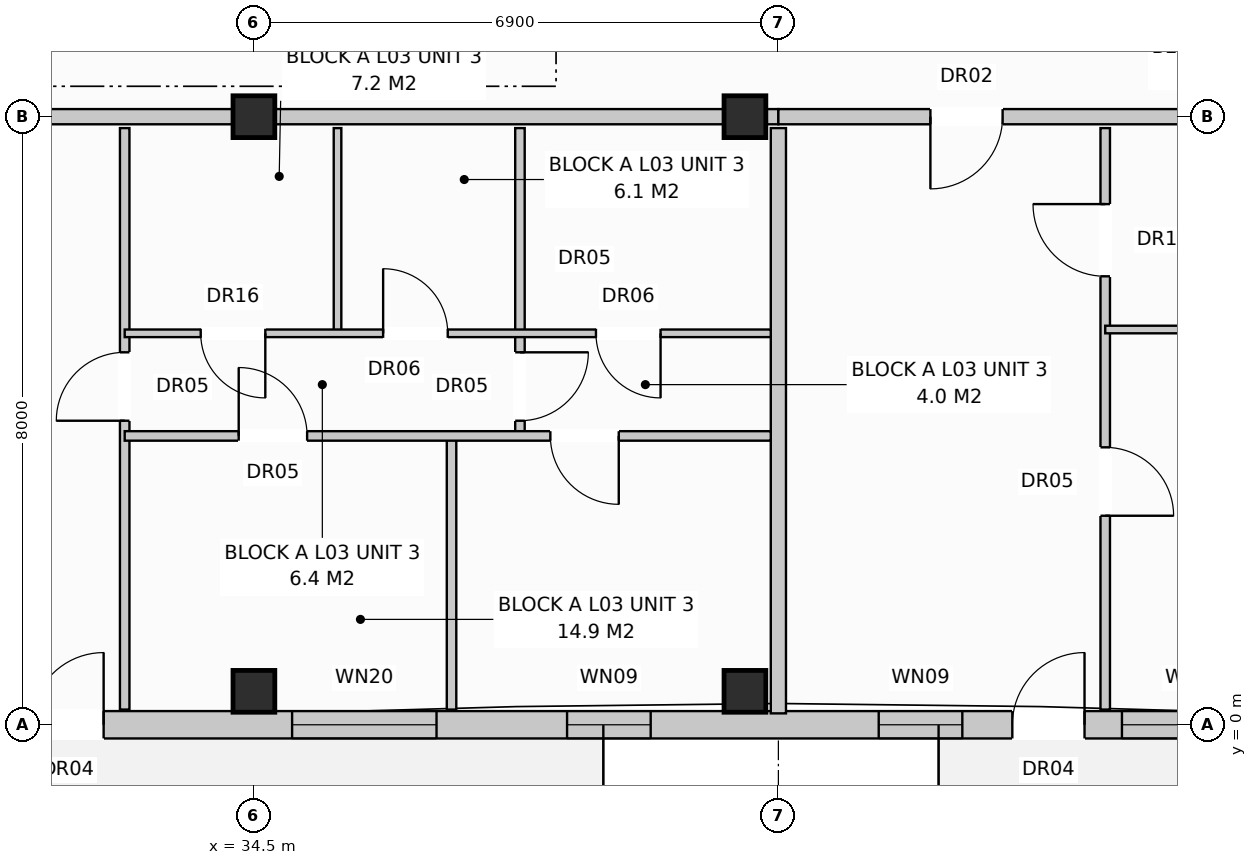
"""IFC4 building model, lengths in metres.
Left out: names, types, materials, properties, quantities, classifications, styles, units other than length and angle.
Written with IfcOpenShell. Run it as: python <this file> out.ifc"""

import sys

from ifc_helpers import new_model, si_unit, direction, frame, frame_2d, origin, origin_with_axes, origin_2d, place, context, subcontext, project, spatial, rectangle, extrude, element, fill, save


model = new_model("IFC4")
c1 = context("Model", 3, precision=1e-05, world=origin(), true_north=direction((0.0, 1.0)))
c2 = subcontext(c1, "Body", "Model", "MODEL_VIEW")
j1 = project(units=[si_unit("LENGTHUNIT", "METRE"), si_unit("PLANEANGLEUNIT", "RADIAN")], contexts=[c1])
p1 = place(None, origin())
s1 = spatial("IfcSite", under=j1, at=p1, CompositionType="ELEMENT")
p2 = place(p1, origin())
s2 = spatial("IfcBuilding", under=s1, at=p2, CompositionType="ELEMENT")
p3 = place(p2, frame((0.0, 0.0, 11.2)))
s3 = spatial("IfcBuildingStorey", under=s2, at=p3, CompositionType="ELEMENT", Elevation=11.2)
for number, where, z_axis, x_axis in (
    (1, (34.5, 0.44, 0.0), (0.0, 0.0, 1.0), (1.0, 0.0, 0.0)),
    (2, (34.5, 8.0, 0.0), (0.0, 0.0, 1.0), (1.0, 0.0, 0.0)),
    (3, (40.96, 0.44, 0.0), (0.0, 0.0, 1.0), (1.0, 0.0, 0.0)),
    (4, (40.96, 8.0, 0.0), (0.0, 0.0, 1.0), (1.0, 0.0, 0.0)),
):
    element("IfcColumn", number, at=place(p3, frame(where, z_axis=z_axis, x_axis=x_axis)), inside=s3, PredefinedType="COLUMN", context=c2, shape_type="SweptSolid", body=[
        extrude(rectangle(XDim=0.55, YDim=0.55, at=origin_2d()), origin(), (0.0, 0.0, 1.0), 3.2),
    ])
p4 = place(p3, frame((0.17, 0.0, 0.0), z_axis=(0.0, 0.0, 1.0), x_axis=(1.0, 0.0, 0.0)))
e5 = element("IfcWall", 5, at=p4, inside=s3, PredefinedType="STANDARD", context=c2, shape_type="SweptSolid", body=[
    extrude(rectangle(XDim=54.86, YDim=0.36, at=frame_2d((27.43, 0.0))), origin(), (0.0, 0.0, 1.0), 2.94),
])
p5 = place(p4, frame((4.903, 0.0, 0.0)))
e6 = element("IfcOpeningElement", 6, at=p5, cuts=e5, PredefinedType="OPENING", context=c2, shape_type="SweptSolid", body=[
    extrude(rectangle(XDim=0.95, YDim=2.1, at=frame_2d((0.475, 1.05))), frame((0.0, 0.192, 0.0), z_axis=(0.0, -1.0, 0.0), x_axis=(1.0, 0.0, 0.0)), (0.0, 0.0, 1.0), 0.384),
])
p6 = place(p4, frame((18.9, 0.0, 0.0)))
e7 = element("IfcOpeningElement", 7, at=p6, cuts=e5, PredefinedType="OPENING", context=c2, shape_type="SweptSolid", body=[
    extrude(rectangle(XDim=0.95, YDim=2.1, at=frame_2d((0.475, 1.05))), frame((0.0, 0.192, 0.0), z_axis=(0.0, -1.0, 0.0), x_axis=(1.0, 0.0, 0.0)), (0.0, 0.0, 1.0), 0.384),
])
p7 = place(p4, frame((31.403, 0.0, 0.0)))
e8 = element("IfcOpeningElement", 8, at=p7, cuts=e5, PredefinedType="OPENING", context=c2, shape_type="SweptSolid", body=[
    extrude(rectangle(XDim=0.95, YDim=2.1, at=frame_2d((0.475, 1.05))), frame((0.0, 0.192, 0.0), z_axis=(0.0, -1.0, 0.0), x_axis=(1.0, 0.0, 0.0)), (0.0, 0.0, 1.0), 0.384),
])
p8 = place(p4, frame((44.308, 0.0, 0.0)))
e9 = element("IfcOpeningElement", 9, at=p8, cuts=e5, PredefinedType="OPENING", context=c2, shape_type="SweptSolid", body=[
    extrude(rectangle(XDim=0.95, YDim=2.1, at=frame_2d((0.475, 1.05))), frame((0.0, 0.192, 0.0), z_axis=(0.0, -1.0, 0.0), x_axis=(1.0, 0.0, 0.0)), (0.0, 0.0, 1.0), 0.384),
])
p9 = place(p4, frame((2.1, 0.0, 0.8)))
e10 = element("IfcOpeningElement", 10, at=p9, cuts=e5, PredefinedType="OPENING", context=c2, shape_type="SweptSolid", body=[
    extrude(rectangle(XDim=1.8, YDim=1.7, at=frame_2d((0.9, 0.85))), frame((0.0, 0.192, 0.0), z_axis=(0.0, -1.0, 0.0), x_axis=(1.0, 0.0, 0.0)), (0.0, 0.0, 1.0), 0.384),
])
p10 = place(p4, frame((7.75, 0.0, 0.72)))
e11 = element("IfcOpeningElement", 11, at=p10, cuts=e5, PredefinedType="OPENING", context=c2, shape_type="SweptSolid", body=[
    extrude(rectangle(XDim=1.9, YDim=1.85, at=frame_2d((0.95, 0.925))), frame((0.0, 0.192, 0.0), z_axis=(0.0, -1.0, 0.0), x_axis=(1.0, 0.0, 0.0)), (0.0, 0.0, 1.0), 0.384),
])
p11 = place(p4, frame((14.55, 0.0, 0.72)))
e12 = element("IfcOpeningElement", 12, at=p11, cuts=e5, PredefinedType="OPENING", context=c2, shape_type="SweptSolid", body=[
    extrude(rectangle(XDim=1.1, YDim=1.5, at=frame_2d((0.55, 0.75))), frame((0.0, 0.192, 0.0), z_axis=(0.0, -1.0, 0.0), x_axis=(1.0, 0.0, 0.0)), (0.0, 0.0, 1.0), 0.384),
])
p12 = place(p4, frame((16.8, 0.0, 0.8)))
e13 = element("IfcOpeningElement", 13, at=p12, cuts=e5, PredefinedType="OPENING", context=c2, shape_type="SweptSolid", body=[
    extrude(rectangle(XDim=1.8, YDim=1.7, at=frame_2d((0.9, 0.85))), frame((0.0, 0.192, 0.0), z_axis=(0.0, -1.0, 0.0), x_axis=(1.0, 0.0, 0.0)), (0.0, 0.0, 1.0), 0.384),
])
p13 = place(p4, frame((21.55, 0.0, 0.72)))
e14 = element("IfcOpeningElement", 14, at=p13, cuts=e5, PredefinedType="OPENING", context=c2, shape_type="SweptSolid", body=[
    extrude(rectangle(XDim=1.9, YDim=1.85, at=frame_2d((0.95, 0.925))), frame((0.0, 0.192, 0.0), z_axis=(0.0, -1.0, 0.0), x_axis=(1.0, 0.0, 0.0)), (0.0, 0.0, 1.0), 0.384),
])
p14 = place(p4, frame((25.35, 0.0, 0.72)))
e15 = element("IfcOpeningElement", 15, at=p14, cuts=e5, PredefinedType="OPENING", context=c2, shape_type="SweptSolid", body=[
    extrude(rectangle(XDim=1.1, YDim=1.5, at=frame_2d((0.55, 0.75))), frame((0.0, 0.192, 0.0), z_axis=(0.0, -1.0, 0.0), x_axis=(1.0, 0.0, 0.0)), (0.0, 0.0, 1.0), 0.384),
])
p15 = place(p4, frame((29.55, 0.0, 0.72)))
e16 = element("IfcOpeningElement", 16, at=p15, cuts=e5, PredefinedType="OPENING", context=c2, shape_type="SweptSolid", body=[
    extrude(rectangle(XDim=1.1, YDim=1.5, at=frame_2d((0.55, 0.75))), frame((0.0, 0.192, 0.0), z_axis=(0.0, -1.0, 0.0), x_axis=(1.0, 0.0, 0.0)), (0.0, 0.0, 1.0), 0.384),
])
p16 = place(p4, frame((34.833, 0.0, 0.72)))
e17 = element("IfcOpeningElement", 17, at=p16, cuts=e5, PredefinedType="OPENING", context=c2, shape_type="SweptSolid", body=[
    extrude(rectangle(XDim=1.9, YDim=1.85, at=frame_2d((0.95, 0.925))), frame((0.0, 0.192, 0.0), z_axis=(0.0, -1.0, 0.0), x_axis=(1.0, 0.0, 0.0)), (0.0, 0.0, 1.0), 0.384),
])
p17 = place(p4, frame((38.45, 0.0, 0.72)))
e18 = element("IfcOpeningElement", 18, at=p17, cuts=e5, PredefinedType="OPENING", context=c2, shape_type="SweptSolid", body=[
    extrude(rectangle(XDim=1.1, YDim=1.5, at=frame_2d((0.55, 0.75))), frame((0.0, 0.192, 0.0), z_axis=(0.0, -1.0, 0.0), x_axis=(1.0, 0.0, 0.0)), (0.0, 0.0, 1.0), 0.384),
])
p18 = place(p4, frame((42.55, 0.0, 0.72)))
e19 = element("IfcOpeningElement", 19, at=p18, cuts=e5, PredefinedType="OPENING", context=c2, shape_type="SweptSolid", body=[
    extrude(rectangle(XDim=1.1, YDim=1.5, at=frame_2d((0.55, 0.75))), frame((0.0, 0.192, 0.0), z_axis=(0.0, -1.0, 0.0), x_axis=(1.0, 0.0, 0.0)), (0.0, 0.0, 1.0), 0.384),
])
p19 = place(p4, frame((45.75, 0.0, 0.72)))
e20 = element("IfcOpeningElement", 20, at=p19, cuts=e5, PredefinedType="OPENING", context=c2, shape_type="SweptSolid", body=[
    extrude(rectangle(XDim=1.9, YDim=1.85, at=frame_2d((0.95, 0.925))), frame((0.0, 0.192, 0.0), z_axis=(0.0, -1.0, 0.0), x_axis=(1.0, 0.0, 0.0)), (0.0, 0.0, 1.0), 0.384),
])
p20 = place(p4, frame((49.125, 0.0, 0.8)))
e21 = element("IfcOpeningElement", 21, at=p20, cuts=e5, PredefinedType="OPENING", context=c2, shape_type="SweptSolid", body=[
    extrude(rectangle(XDim=1.95, YDim=1.65, at=frame_2d((0.975, 0.825))), frame((0.0, 0.192, 0.0), z_axis=(0.0, -1.0, 0.0), x_axis=(1.0, 0.0, 0.0)), (0.0, 0.0, 1.0), 0.384),
])
p21 = place(p4, frame((52.95, 0.0, 0.72)))
e22 = element("IfcOpeningElement", 22, at=p21, cuts=e5, PredefinedType="OPENING", context=c2, shape_type="SweptSolid", body=[
    extrude(rectangle(XDim=1.1, YDim=1.5, at=frame_2d((0.55, 0.75))), frame((0.0, 0.192, 0.0), z_axis=(0.0, -1.0, 0.0), x_axis=(1.0, 0.0, 0.0)), (0.0, 0.0, 1.0), 0.384),
])
p22 = place(p3, frame((41.4, 7.85, 0.0), z_axis=(0.0, 0.0, 1.0), x_axis=(0.0, -1.0, 0.0)))
e23 = element("IfcWall", 23, at=p22, inside=s3, PredefinedType="PARTITIONING", context=c2, shape_type="SweptSolid", body=[
    extrude(rectangle(XDim=7.7, YDim=0.2, at=frame_2d((3.85, 0.0))), origin(), (0.0, 0.0, 1.0), 2.94),
])
p23 = place(p3, frame((27.6, 8.0, 0.0), z_axis=(0.0, 0.0, 1.0), x_axis=(1.0, 0.0, 0.0)))
e24 = element("IfcWall", 24, at=p23, inside=s3, PredefinedType="PARTITIONING", context=c2, shape_type="SweptSolid", body=[
    extrude(rectangle(XDim=13.8, YDim=0.2, at=frame_2d((6.9, 0.0))), origin(), (0.0, 0.0, 1.0), 2.38),
])
p24 = place(p23, frame((2.4, 0.0, 0.0)))
e25 = element("IfcOpeningElement", 25, at=p24, cuts=e24, PredefinedType="OPENING", context=c2, shape_type="SweptSolid", body=[
    extrude(rectangle(XDim=0.95, YDim=2.15, at=frame_2d((0.475, 1.075))), frame((0.0, 0.112, 0.0), z_axis=(0.0, -1.0, 0.0), x_axis=(1.0, 0.0, 0.0)), (0.0, 0.0, 1.0), 0.224),
])
p25 = place(p3, frame((32.8, 7.85, 0.0), z_axis=(0.0, 0.0, 1.0), x_axis=(0.0, -1.0, 0.0)))
e26 = element("IfcWall", 26, at=p25, inside=s3, PredefinedType="PARTITIONING", context=c2, shape_type="SweptSolid", body=[
    extrude(rectangle(XDim=7.65, YDim=0.125, at=frame_2d((3.825, 0.0))), origin(), (0.0, 0.0, 1.0), 2.94),
])
p26 = place(p25, frame((2.95, 0.0, 0.0)))
e27 = element("IfcOpeningElement", 27, at=p26, cuts=e26, PredefinedType="OPENING", context=c2, shape_type="SweptSolid", body=[
    extrude(rectangle(XDim=0.9, YDim=2.1, at=frame_2d((0.45, 1.05))), frame((0.0, 0.074, 0.0), z_axis=(0.0, -1.0, 0.0), x_axis=(1.0, 0.0, 0.0)), (0.0, 0.0, 1.0), 0.149),
])
p27 = place(p3, frame((35.6, 7.85, 0.0), z_axis=(0.0, 0.0, 1.0), x_axis=(0.0, -1.0, 0.0)))
e28 = element("IfcWall", 28, at=p27, inside=s3, PredefinedType="PARTITIONING", context=c2, shape_type="SweptSolid", body=[
    extrude(rectangle(XDim=2.7, YDim=0.1, at=frame_2d((1.35, 0.0))), origin(), (0.0, 0.0, 1.0), 2.94),
])
p28 = place(p3, frame((38.0, 7.85, 0.0), z_axis=(0.0, 0.0, 1.0), x_axis=(0.0, -1.0, 0.0)))
e29 = element("IfcWall", 29, at=p28, inside=s3, PredefinedType="PARTITIONING", context=c2, shape_type="SweptSolid", body=[
    extrude(rectangle(XDim=4.05, YDim=0.125, at=frame_2d((2.025, 0.0))), origin(), (0.0, 0.0, 1.0), 2.94),
])
p29 = place(p28, frame((2.95, 0.0, 0.0)))
e30 = element("IfcOpeningElement", 30, at=p29, cuts=e29, PredefinedType="OPENING", context=c2, shape_type="SweptSolid", body=[
    extrude(rectangle(XDim=0.9, YDim=2.1, at=frame_2d((0.45, 1.05))), frame((0.0, 0.074, 0.0), z_axis=(0.0, -1.0, 0.0), x_axis=(1.0, 0.0, 0.0)), (0.0, 0.0, 1.0), 0.149),
])
p30 = place(p3, frame((37.1, 3.8, 0.0), z_axis=(0.0, 0.0, 1.0), x_axis=(0.0, -1.0, 0.0)))
e31 = element("IfcWall", 31, at=p30, inside=s3, PredefinedType="PARTITIONING", context=c2, shape_type="SweptSolid", body=[
    extrude(rectangle(XDim=3.6, YDim=0.125, at=frame_2d((1.8, 0.0))), origin(), (0.0, 0.0, 1.0), 2.94),
])
p31 = place(p3, frame((32.8, 5.15, 0.0), z_axis=(0.0, 0.0, 1.0), x_axis=(1.0, 0.0, 0.0)))
e32 = element("IfcWall", 32, at=p31, inside=s3, PredefinedType="PARTITIONING", context=c2, shape_type="SweptSolid", body=[
    extrude(rectangle(XDim=8.5, YDim=0.1, at=frame_2d((4.25, 0.0))), origin(), (0.0, 0.0, 1.0), 2.94),
])
p32 = place(p31, frame((1.0, 0.0, 0.0)))
e33 = element("IfcOpeningElement", 33, at=p32, cuts=e32, PredefinedType="OPENING", context=c2, shape_type="SweptSolid", body=[
    extrude(rectangle(XDim=0.85, YDim=2.1, at=frame_2d((0.425, 1.05))), frame((0.0, 0.062, 0.0), z_axis=(0.0, -1.0, 0.0), x_axis=(1.0, 0.0, 0.0)), (0.0, 0.0, 1.0), 0.124),
])
p33 = place(p31, frame((3.4, 0.0, 0.0)))
e34 = element("IfcOpeningElement", 34, at=p33, cuts=e32, PredefinedType="OPENING", context=c2, shape_type="SweptSolid", body=[
    extrude(rectangle(XDim=0.85, YDim=2.05, at=frame_2d((0.425, 1.025))), frame((0.0, 0.062, 0.0), z_axis=(0.0, -1.0, 0.0), x_axis=(1.0, 0.0, 0.0)), (0.0, 0.0, 1.0), 0.124),
])
p34 = place(p31, frame((6.2, 0.0, 0.0)))
e35 = element("IfcOpeningElement", 35, at=p34, cuts=e32, PredefinedType="OPENING", context=c2, shape_type="SweptSolid", body=[
    extrude(rectangle(XDim=0.85, YDim=2.05, at=frame_2d((0.425, 1.025))), frame((0.0, 0.062, 0.0), z_axis=(0.0, -1.0, 0.0), x_axis=(1.0, 0.0, 0.0)), (0.0, 0.0, 1.0), 0.124),
])
p35 = place(p3, frame((32.8, 3.8, 0.0), z_axis=(0.0, 0.0, 1.0), x_axis=(1.0, 0.0, 0.0)))
e36 = element("IfcWall", 36, at=p35, inside=s3, PredefinedType="PARTITIONING", context=c2, shape_type="SweptSolid", body=[
    extrude(rectangle(XDim=8.5, YDim=0.125, at=frame_2d((4.25, 0.0))), origin(), (0.0, 0.0, 1.0), 2.94),
])
p36 = place(p35, frame((1.5, 0.0, 0.0)))
e37 = element("IfcOpeningElement", 37, at=p36, cuts=e36, PredefinedType="OPENING", context=c2, shape_type="SweptSolid", body=[
    extrude(rectangle(XDim=0.9, YDim=2.1, at=frame_2d((0.45, 1.05))), frame((0.0, 0.074, 0.0), z_axis=(0.0, -1.0, 0.0), x_axis=(1.0, 0.0, 0.0)), (0.0, 0.0, 1.0), 0.149),
])
p37 = place(p35, frame((5.6, 0.0, 0.0)))
e38 = element("IfcOpeningElement", 38, at=p37, cuts=e36, PredefinedType="OPENING", context=c2, shape_type="SweptSolid", body=[
    extrude(rectangle(XDim=0.9, YDim=2.1, at=frame_2d((0.45, 1.05))), frame((0.0, 0.074, 0.0), z_axis=(0.0, -1.0, 0.0), x_axis=(1.0, 0.0, 0.0)), (0.0, 0.0, 1.0), 0.149),
])
p38 = place(p3, frame((41.4, 8.0, 0.0), z_axis=(0.0, 0.0, 1.0), x_axis=(1.0, 0.0, 0.0)))
e39 = element("IfcWall", 39, at=p38, inside=s3, PredefinedType="PARTITIONING", context=c2, shape_type="SweptSolid", body=[
    extrude(rectangle(XDim=6.9, YDim=0.2, at=frame_2d((3.45, 0.0))), origin(), (0.0, 0.0, 1.0), 2.38),
])
p39 = place(p38, frame((2.0, 0.0, 0.0)))
e40 = element("IfcOpeningElement", 40, at=p39, cuts=e39, PredefinedType="OPENING", context=c2, shape_type="SweptSolid", body=[
    extrude(rectangle(XDim=0.95, YDim=2.15, at=frame_2d((0.475, 1.075))), frame((0.0, 0.112, 0.0), z_axis=(0.0, -1.0, 0.0), x_axis=(1.0, 0.0, 0.0)), (0.0, 0.0, 1.0), 0.224),
])
p40 = place(p3, frame((45.7, 7.85, 0.0), z_axis=(0.0, 0.0, 1.0), x_axis=(0.0, -1.0, 0.0)))
e41 = element("IfcWall", 41, at=p40, inside=s3, PredefinedType="PARTITIONING", context=c2, shape_type="SweptSolid", body=[
    extrude(rectangle(XDim=7.65, YDim=0.125, at=frame_2d((3.825, 0.0))), origin(), (0.0, 0.0, 1.0), 2.94),
])
p41 = place(p40, frame((1.0, 0.0, 0.0)))
e42 = element("IfcOpeningElement", 42, at=p41, cuts=e41, PredefinedType="OPENING", context=c2, shape_type="SweptSolid", body=[
    extrude(rectangle(XDim=0.95, YDim=2.1, at=frame_2d((0.475, 1.05))), frame((0.0, 0.074, 0.0), z_axis=(0.0, -1.0, 0.0), x_axis=(1.0, 0.0, 0.0)), (0.0, 0.0, 1.0), 0.149),
])
p42 = place(p40, frame((4.2, 0.0, 0.0)))
e43 = element("IfcOpeningElement", 43, at=p42, cuts=e41, PredefinedType="OPENING", context=c2, shape_type="SweptSolid", body=[
    extrude(rectangle(XDim=0.9, YDim=2.1, at=frame_2d((0.45, 1.05))), frame((0.0, 0.074, 0.0), z_axis=(0.0, -1.0, 0.0), x_axis=(1.0, 0.0, 0.0)), (0.0, 0.0, 1.0), 0.149),
])
p43 = place(p3, frame((45.7, 5.2, 0.0), z_axis=(0.0, 0.0, 1.0), x_axis=(1.0, 0.0, 0.0)))
e44 = element("IfcWall", 44, at=p43, inside=s3, PredefinedType="PARTITIONING", context=c2, shape_type="SweptSolid", body=[
    extrude(rectangle(XDim=2.5, YDim=0.1, at=frame_2d((1.25, 0.0))), origin(), (0.0, 0.0, 1.0), 2.94),
])
p44 = place(p7, origin_with_axes())
e45 = element("IfcDoor", 45, at=p44, inside=s3, OperationType="SINGLE_SWING_RIGHT", PredefinedType="DOOR", context=c2, shape_type="SweptSolid", body=[
    extrude(rectangle(XDim=0.95, YDim=2.1, at=frame_2d((0.475, 1.05))), frame((0.0, 0.025, 0.0), z_axis=(0.0, -1.0, 0.0), x_axis=(1.0, 0.0, 0.0)), (0.0, 0.0, 1.0), 0.05),
])
fill(e8, e45)
p45 = place(p8, origin_with_axes())
e46 = element("IfcDoor", 46, at=p45, inside=s3, OperationType="SINGLE_SWING_RIGHT", PredefinedType="DOOR", context=c2, shape_type="SweptSolid", body=[
    extrude(rectangle(XDim=0.95, YDim=2.1, at=frame_2d((0.475, 1.05))), frame((0.0, 0.025, 0.0), z_axis=(0.0, -1.0, 0.0), x_axis=(1.0, 0.0, 0.0)), (0.0, 0.0, 1.0), 0.05),
])
fill(e9, e46)
p46 = place(p16, origin_with_axes())
e47 = element("IfcWindow", 47, at=p46, inside=s3, PartitioningType="SINGLE_PANEL", PredefinedType="WINDOW", context=c2, shape_type="SweptSolid", body=[
    extrude(rectangle(XDim=1.9, YDim=1.85, at=frame_2d((0.95, 0.925))), frame((0.0, 0.03, 0.0), z_axis=(0.0, -1.0, 0.0), x_axis=(1.0, 0.0, 0.0)), (0.0, 0.0, 1.0), 0.06),
])
fill(e17, e47)
p47 = place(p17, origin_with_axes())
e48 = element("IfcWindow", 48, at=p47, inside=s3, PartitioningType="SINGLE_PANEL", PredefinedType="WINDOW", context=c2, shape_type="SweptSolid", body=[
    extrude(rectangle(XDim=1.1, YDim=1.5, at=frame_2d((0.55, 0.75))), frame((0.0, 0.03, 0.0), z_axis=(0.0, -1.0, 0.0), x_axis=(1.0, 0.0, 0.0)), (0.0, 0.0, 1.0), 0.06),
])
fill(e18, e48)
p48 = place(p18, origin_with_axes())
e49 = element("IfcWindow", 49, at=p48, inside=s3, PartitioningType="SINGLE_PANEL", PredefinedType="WINDOW", context=c2, shape_type="SweptSolid", body=[
    extrude(rectangle(XDim=1.1, YDim=1.5, at=frame_2d((0.55, 0.75))), frame((0.0, 0.03, 0.0), z_axis=(0.0, -1.0, 0.0), x_axis=(1.0, 0.0, 0.0)), (0.0, 0.0, 1.0), 0.06),
])
fill(e19, e49)
p49 = place(p19, origin_with_axes())
e50 = element("IfcWindow", 50, at=p49, inside=s3, PartitioningType="SINGLE_PANEL", PredefinedType="WINDOW", context=c2, shape_type="SweptSolid", body=[
    extrude(rectangle(XDim=1.9, YDim=1.85, at=frame_2d((0.95, 0.925))), frame((0.0, 0.03, 0.0), z_axis=(0.0, -1.0, 0.0), x_axis=(1.0, 0.0, 0.0)), (0.0, 0.0, 1.0), 0.06),
])
fill(e20, e50)
p50 = place(p26, frame((0.9, 0.0, 0.0), z_axis=(0.0, 0.0, 1.0), x_axis=(-1.0, 0.0, 0.0)))
e51 = element("IfcDoor", 51, at=p50, inside=s3, OperationType="SINGLE_SWING_RIGHT", PredefinedType="DOOR", context=c2, shape_type="SweptSolid", body=[
    extrude(rectangle(XDim=0.9, YDim=2.1, at=frame_2d((0.45, 1.05))), frame((0.0, 0.025, 0.0), z_axis=(0.0, -1.0, 0.0), x_axis=(1.0, 0.0, 0.0)), (0.0, 0.0, 1.0), 0.05),
])
fill(e27, e51)
p51 = place(p29, origin_with_axes())
e52 = element("IfcDoor", 52, at=p51, inside=s3, OperationType="SINGLE_SWING_LEFT", PredefinedType="DOOR", context=c2, shape_type="SweptSolid", body=[
    extrude(rectangle(XDim=0.9, YDim=2.1, at=frame_2d((0.45, 1.05))), frame((0.0, 0.025, 0.0), z_axis=(0.0, -1.0, 0.0), x_axis=(1.0, 0.0, 0.0)), (0.0, 0.0, 1.0), 0.05),
])
fill(e30, e52)
p52 = place(p32, frame((0.85, 0.0, 0.0), z_axis=(0.0, 0.0, 1.0), x_axis=(-1.0, 0.0, 0.0)))
e53 = element("IfcDoor", 53, at=p52, inside=s3, OperationType="SINGLE_SWING_RIGHT", PredefinedType="DOOR", context=c2, shape_type="SweptSolid", body=[
    extrude(rectangle(XDim=0.85, YDim=2.1, at=frame_2d((0.425, 1.05))), frame((0.0, 0.025, 0.0), z_axis=(0.0, -1.0, 0.0), x_axis=(1.0, 0.0, 0.0)), (0.0, 0.0, 1.0), 0.05),
])
fill(e33, e53)
p53 = place(p33, origin_with_axes())
e54 = element("IfcDoor", 54, at=p53, inside=s3, OperationType="SINGLE_SWING_LEFT", PredefinedType="DOOR", context=c2, shape_type="SweptSolid", body=[
    extrude(rectangle(XDim=0.85, YDim=2.05, at=frame_2d((0.425, 1.025))), frame((0.0, 0.025, 0.0), z_axis=(0.0, -1.0, 0.0), x_axis=(1.0, 0.0, 0.0)), (0.0, 0.0, 1.0), 0.05),
])
fill(e34, e54)
p54 = place(p34, frame((0.85, 0.0, 0.0), z_axis=(0.0, 0.0, 1.0), x_axis=(-1.0, 0.0, 0.0)))
e55 = element("IfcDoor", 55, at=p54, inside=s3, OperationType="SINGLE_SWING_RIGHT", PredefinedType="DOOR", context=c2, shape_type="SweptSolid", body=[
    extrude(rectangle(XDim=0.85, YDim=2.05, at=frame_2d((0.425, 1.025))), frame((0.0, 0.025, 0.0), z_axis=(0.0, -1.0, 0.0), x_axis=(1.0, 0.0, 0.0)), (0.0, 0.0, 1.0), 0.05),
])
fill(e35, e55)
p55 = place(p36, origin_with_axes())
e56 = element("IfcDoor", 56, at=p55, inside=s3, OperationType="SINGLE_SWING_LEFT", PredefinedType="DOOR", context=c2, shape_type="SweptSolid", body=[
    extrude(rectangle(XDim=0.9, YDim=2.1, at=frame_2d((0.45, 1.05))), frame((0.0, 0.025, 0.0), z_axis=(0.0, -1.0, 0.0), x_axis=(1.0, 0.0, 0.0)), (0.0, 0.0, 1.0), 0.05),
])
fill(e37, e56)
p56 = place(p37, frame((0.9, 0.0, 0.0), z_axis=(0.0, 0.0, 1.0), x_axis=(-1.0, 0.0, 0.0)))
e57 = element("IfcDoor", 57, at=p56, inside=s3, OperationType="SINGLE_SWING_RIGHT", PredefinedType="DOOR", context=c2, shape_type="SweptSolid", body=[
    extrude(rectangle(XDim=0.9, YDim=2.1, at=frame_2d((0.45, 1.05))), frame((0.0, 0.025, 0.0), z_axis=(0.0, -1.0, 0.0), x_axis=(1.0, 0.0, 0.0)), (0.0, 0.0, 1.0), 0.05),
])
fill(e38, e57)
p57 = place(p39, frame((0.95, 0.0, 0.0), z_axis=(0.0, 0.0, 1.0), x_axis=(-1.0, 0.0, 0.0)))
e58 = element("IfcDoor", 58, at=p57, inside=s3, OperationType="SINGLE_SWING_LEFT", PredefinedType="DOOR", context=c2, shape_type="SweptSolid", body=[
    extrude(rectangle(XDim=0.95, YDim=2.15, at=frame_2d((0.475, 1.075))), frame((0.0, 0.025, 0.0), z_axis=(0.0, -1.0, 0.0), x_axis=(1.0, 0.0, 0.0)), (0.0, 0.0, 1.0), 0.05),
])
fill(e40, e58)
p58 = place(p41, frame((0.95, 0.0, 0.0), z_axis=(0.0, 0.0, 1.0), x_axis=(-1.0, 0.0, 0.0)))
e59 = element("IfcDoor", 59, at=p58, inside=s3, OperationType="SINGLE_SWING_LEFT", PredefinedType="DOOR", context=c2, shape_type="SweptSolid", body=[
    extrude(rectangle(XDim=0.95, YDim=2.1, at=frame_2d((0.475, 1.05))), frame((0.0, 0.025, 0.0), z_axis=(0.0, -1.0, 0.0), x_axis=(1.0, 0.0, 0.0)), (0.0, 0.0, 1.0), 0.05),
])
fill(e42, e59)
p59 = place(p42, origin_with_axes())
e60 = element("IfcDoor", 60, at=p59, inside=s3, OperationType="SINGLE_SWING_RIGHT", PredefinedType="DOOR", context=c2, shape_type="SweptSolid", body=[
    extrude(rectangle(XDim=0.9, YDim=2.1, at=frame_2d((0.45, 1.05))), frame((0.0, 0.025, 0.0), z_axis=(0.0, -1.0, 0.0), x_axis=(1.0, 0.0, 0.0)), (0.0, 0.0, 1.0), 0.05),
])
fill(e43, e60)
save(model, sys.argv[1])
